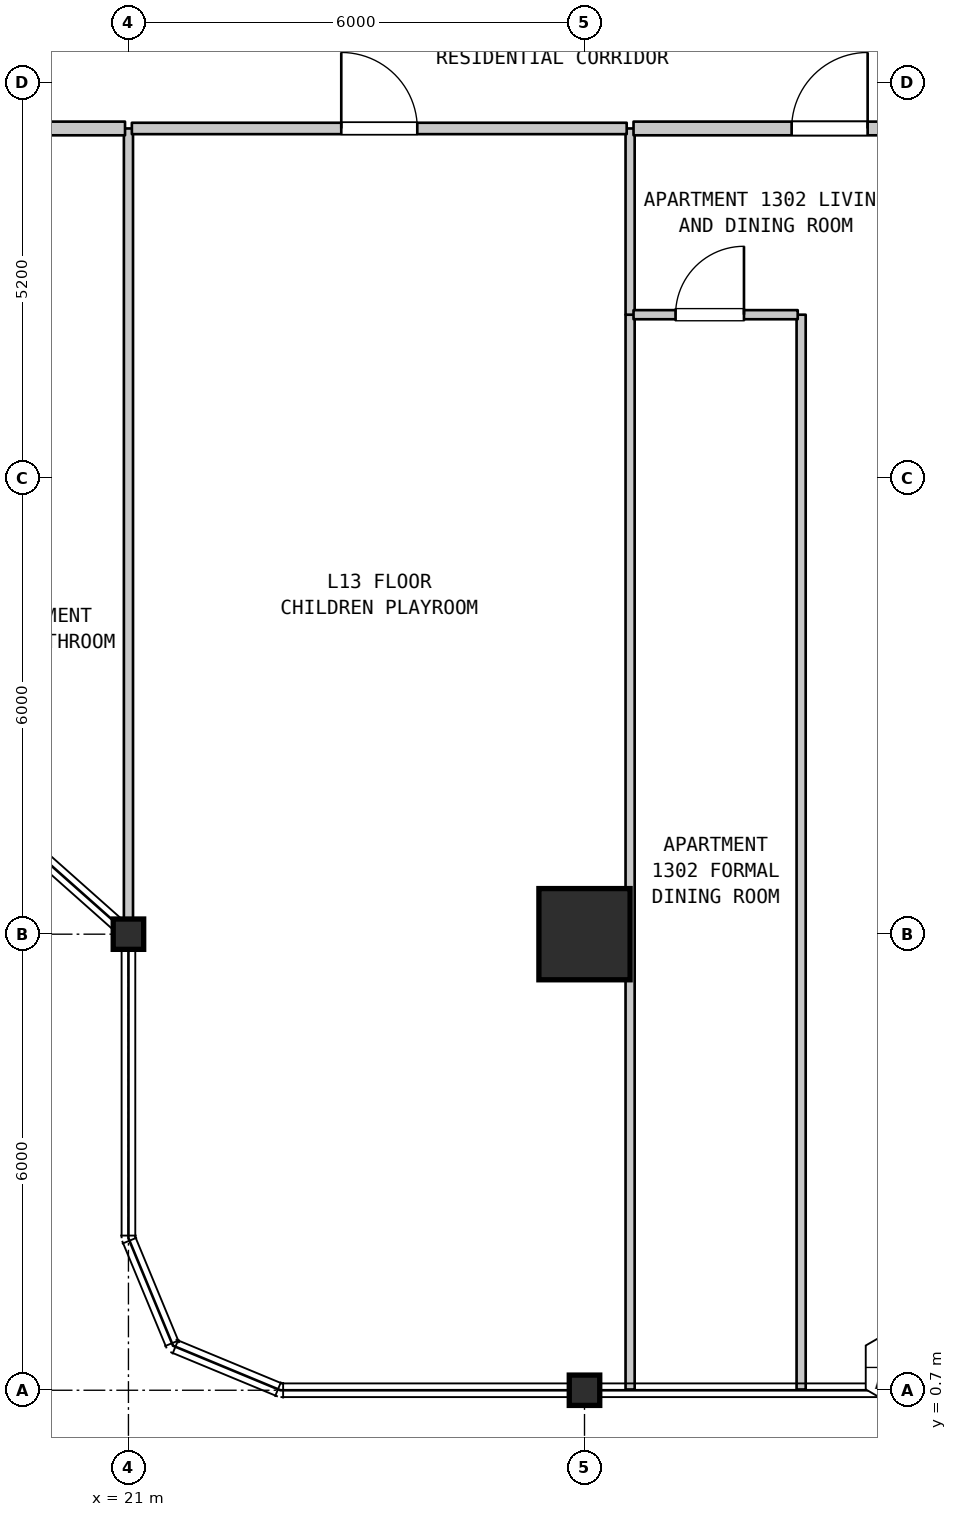
"""IFC4 building model, lengths in metres.
Left out: names, types, materials, properties, quantities, classifications, styles, units other than length and angle.
Written with IfcOpenShell. Run it as: python <this file> out.ifc"""

import sys

from ifc_helpers import new_model, si_unit, direction, frame, frame_2d, origin, origin_2d, place, context, subcontext, project, spatial, rectangle, i_section, extrude, element, fill, save


model = new_model("IFC4")
c1 = context("Model", 3, precision=1e-05, world=origin(), true_north=direction((0.0, 1.0)))
c2 = subcontext(c1, "Body", "Model", "MODEL_VIEW")
j1 = project(units=[si_unit("LENGTHUNIT", "METRE"), si_unit("PLANEANGLEUNIT", "RADIAN")], contexts=[c1])
p1 = place(None, origin())
s1 = spatial("IfcSite", under=j1, at=p1, CompositionType="ELEMENT")
p2 = place(p1, origin())
s2 = spatial("IfcBuilding", under=s1, at=p2, CompositionType="ELEMENT")
p3 = place(p2, frame((0.0, 0.0, 57.3)))
s3 = spatial("IfcBuildingStorey", under=s2, at=p3, CompositionType="ELEMENT", Elevation=57.3)
for number, where, z_axis, x_axis in (
    (1, (21.0, 6.7, 0.0), (0.0, 0.0, 1.0), (1.0, 0.0, 0.0)),
    (2, (27.0, 0.7, 0.0), (0.0, 0.0, 1.0), (1.0, 0.0, 0.0)),
):
    element("IfcColumn", number, at=place(p3, frame(where, z_axis=z_axis, x_axis=x_axis)), inside=s3, PredefinedType="COLUMN", context=c2, shape_type="SweptSolid", body=[
        extrude(i_section(OverallWidth=0.401, OverallDepth=0.399, WebThickness=0.025, FlangeThickness=0.04, FilletRadius=0.015, at=origin_2d()), origin(), (0.0, 0.0, 1.0), 3.7),
    ])
p4 = place(p3, frame((27.0, 6.7, 0.0), z_axis=(0.0, 0.0, 1.0), x_axis=(1.0, 0.0, 0.0)))
e3 = element("IfcColumn", 3, at=p4, inside=s3, PredefinedType="COLUMN", context=c2, shape_type="SweptSolid", body=[
    extrude(rectangle(XDim=1.2, YDim=1.2, at=origin_2d()), origin(), (0.0, 0.0, 1.0), 3.7),
])
p5 = place(p3, frame((21.0, 6.71, 0.0), z_axis=(0.0, 0.0, 1.0), x_axis=(0.0, 1.0, 0.0)))
e4 = element("IfcWall", 4, at=p5, inside=s3, PredefinedType="PARTITIONING", context=c2, shape_type="SweptSolid", body=[
    extrude(rectangle(XDim=10.59, YDim=0.12, at=frame_2d((5.295, 0.0))), origin(), (0.0, 0.0, 1.0), 3.28),
])
p6 = place(p3, frame((27.6, 0.71, 0.0), z_axis=(0.0, 0.0, 1.0), x_axis=(0.0, 1.0, 0.0)))
e5 = element("IfcWall", 5, at=p6, inside=s3, PredefinedType="PARTITIONING", context=c2, shape_type="SweptSolid", body=[
    extrude(rectangle(XDim=14.14, YDim=0.12, at=frame_2d((7.07, 0.0))), origin(), (0.0, 0.0, 1.0), 3.28),
])
p7 = place(p3, frame((27.6, 14.85, 0.0), z_axis=(0.0, 0.0, 1.0), x_axis=(0.0, 1.0, 0.0)))
e6 = element("IfcWall", 6, at=p7, inside=s3, PredefinedType="PARTITIONING", context=c2, shape_type="SweptSolid", body=[
    extrude(rectangle(XDim=2.45, YDim=0.12, at=frame_2d((1.225, 0.0))), origin(), (0.0, 0.0, 1.0), 3.28),
])
p8 = place(p3, frame((29.85, 0.71, 0.0), z_axis=(0.0, 0.0, 1.0), x_axis=(0.0, 1.0, 0.0)))
e7 = element("IfcWall", 7, at=p8, inside=s3, PredefinedType="PARTITIONING", context=c2, shape_type="SweptSolid", body=[
    extrude(rectangle(XDim=14.14, YDim=0.12, at=frame_2d((7.07, 0.0))), origin(), (0.0, 0.0, 1.0), 3.28),
])
p9 = place(p3, frame((27.645, 14.85, 0.0), z_axis=(0.0, 0.0, 1.0), x_axis=(1.0, 0.0, 0.0)))
e8 = element("IfcWall", 8, at=p9, inside=s3, PredefinedType="PARTITIONING", context=c2, shape_type="SweptSolid", body=[
    extrude(rectangle(XDim=2.16, YDim=0.12, at=frame_2d((1.08, 0.0))), origin(), (0.0, 0.0, 1.0), 3.28),
])
p10 = place(p9, frame((0.553, 0.0, 0.0)))
e9 = element("IfcOpeningElement", 9, at=p10, cuts=e8, PredefinedType="OPENING", context=c2, shape_type="SweptSolid", body=[
    extrude(rectangle(XDim=0.9, YDim=2.15, at=frame_2d((0.45, 1.075))), frame((0.0, 0.07, 0.0), z_axis=(0.0, -1.0, 0.0), x_axis=(1.0, 0.0, 0.0)), (0.0, 0.0, 1.0), 0.14),
])
p11 = place(p3, frame((19.095, 17.3, 0.0), z_axis=(0.0, 0.0, 1.0), x_axis=(1.0, 0.0, 0.0)))
e10 = element("IfcWall", 10, at=p11, inside=s3, PredefinedType="STANDARD", context=c2, shape_type="SweptSolid", body=[
    extrude(rectangle(XDim=1.86, YDim=0.18, at=frame_2d((0.93, 0.0))), origin(), (0.0, 0.0, 1.0), 3.28),
])
p12 = place(p3, frame((21.045, 17.3, 0.0), z_axis=(0.0, 0.0, 1.0), x_axis=(1.0, 0.0, 0.0)))
e11 = element("IfcWall", 11, at=p12, inside=s3, PredefinedType="STANDARD", context=c2, shape_type="SweptSolid", body=[
    extrude(rectangle(XDim=6.51, YDim=0.15, at=frame_2d((3.255, 0.0))), origin(), (0.0, 0.0, 1.0), 3.28),
])
p13 = place(p12, frame((2.755, 0.0, 0.0)))
e12 = element("IfcOpeningElement", 12, at=p13, cuts=e11, PredefinedType="OPENING", context=c2, shape_type="SweptSolid", body=[
    extrude(rectangle(XDim=1.0, YDim=2.15, at=frame_2d((0.5, 1.075))), frame((0.0, 0.085, 0.0), z_axis=(0.0, -1.0, 0.0), x_axis=(1.0, 0.0, 0.0)), (0.0, 0.0, 1.0), 0.17),
])
p14 = place(p3, frame((27.645, 17.3, 0.0), z_axis=(0.0, 0.0, 1.0), x_axis=(1.0, 0.0, 0.0)))
e13 = element("IfcWall", 13, at=p14, inside=s3, PredefinedType="STANDARD", context=c2, shape_type="SweptSolid", body=[
    extrude(rectangle(XDim=5.095, YDim=0.18, at=frame_2d((2.547, 0.0))), origin(), (0.0, 0.0, 1.0), 3.28),
])
p15 = place(p14, frame((2.08, 0.0, 0.0)))
e14 = element("IfcOpeningElement", 14, at=p15, cuts=e13, PredefinedType="OPENING", context=c2, shape_type="SweptSolid", body=[
    extrude(rectangle(XDim=1.0, YDim=2.15, at=frame_2d((0.5, 1.075))), frame((0.0, 0.1, 0.0), z_axis=(0.0, -1.0, 0.0), x_axis=(1.0, 0.0, 0.0)), (0.0, 0.0, 1.0), 0.2),
])
p16 = place(p10, origin())
e15 = element("IfcDoor", 15, at=p16, inside=s3, OperationType="SINGLE_SWING_RIGHT", PredefinedType="DOOR", context=c2, shape_type="SweptSolid", body=[
    extrude(rectangle(XDim=0.9, YDim=2.15, at=frame_2d((0.45, 1.075))), frame((0.0, 0.025, 0.0), z_axis=(0.0, -1.0, 0.0), x_axis=(1.0, 0.0, 0.0)), (0.0, 0.0, 1.0), 0.05),
])
fill(e9, e15)
p17 = place(p13, origin())
e16 = element("IfcDoor", 16, at=p17, inside=s3, OperationType="SINGLE_SWING_LEFT", PredefinedType="DOOR", context=c2, shape_type="SweptSolid", body=[
    extrude(rectangle(XDim=1.0, YDim=2.15, at=frame_2d((0.5, 1.075))), frame((0.0, 0.025, 0.0), z_axis=(0.0, -1.0, 0.0), x_axis=(1.0, 0.0, 0.0)), (0.0, 0.0, 1.0), 0.05),
])
fill(e12, e16)
p18 = place(p15, origin())
e17 = element("IfcDoor", 17, at=p18, inside=s3, OperationType="SINGLE_SWING_RIGHT", PredefinedType="DOOR", context=c2, shape_type="SweptSolid", body=[
    extrude(rectangle(XDim=1.0, YDim=2.15, at=frame_2d((0.5, 1.075))), frame((0.0, 0.025, 0.0), z_axis=(0.0, -1.0, 0.0), x_axis=(1.0, 0.0, 0.0)), (0.0, 0.0, 1.0), 0.05),
])
fill(e14, e17)
save(model, sys.argv[1])
